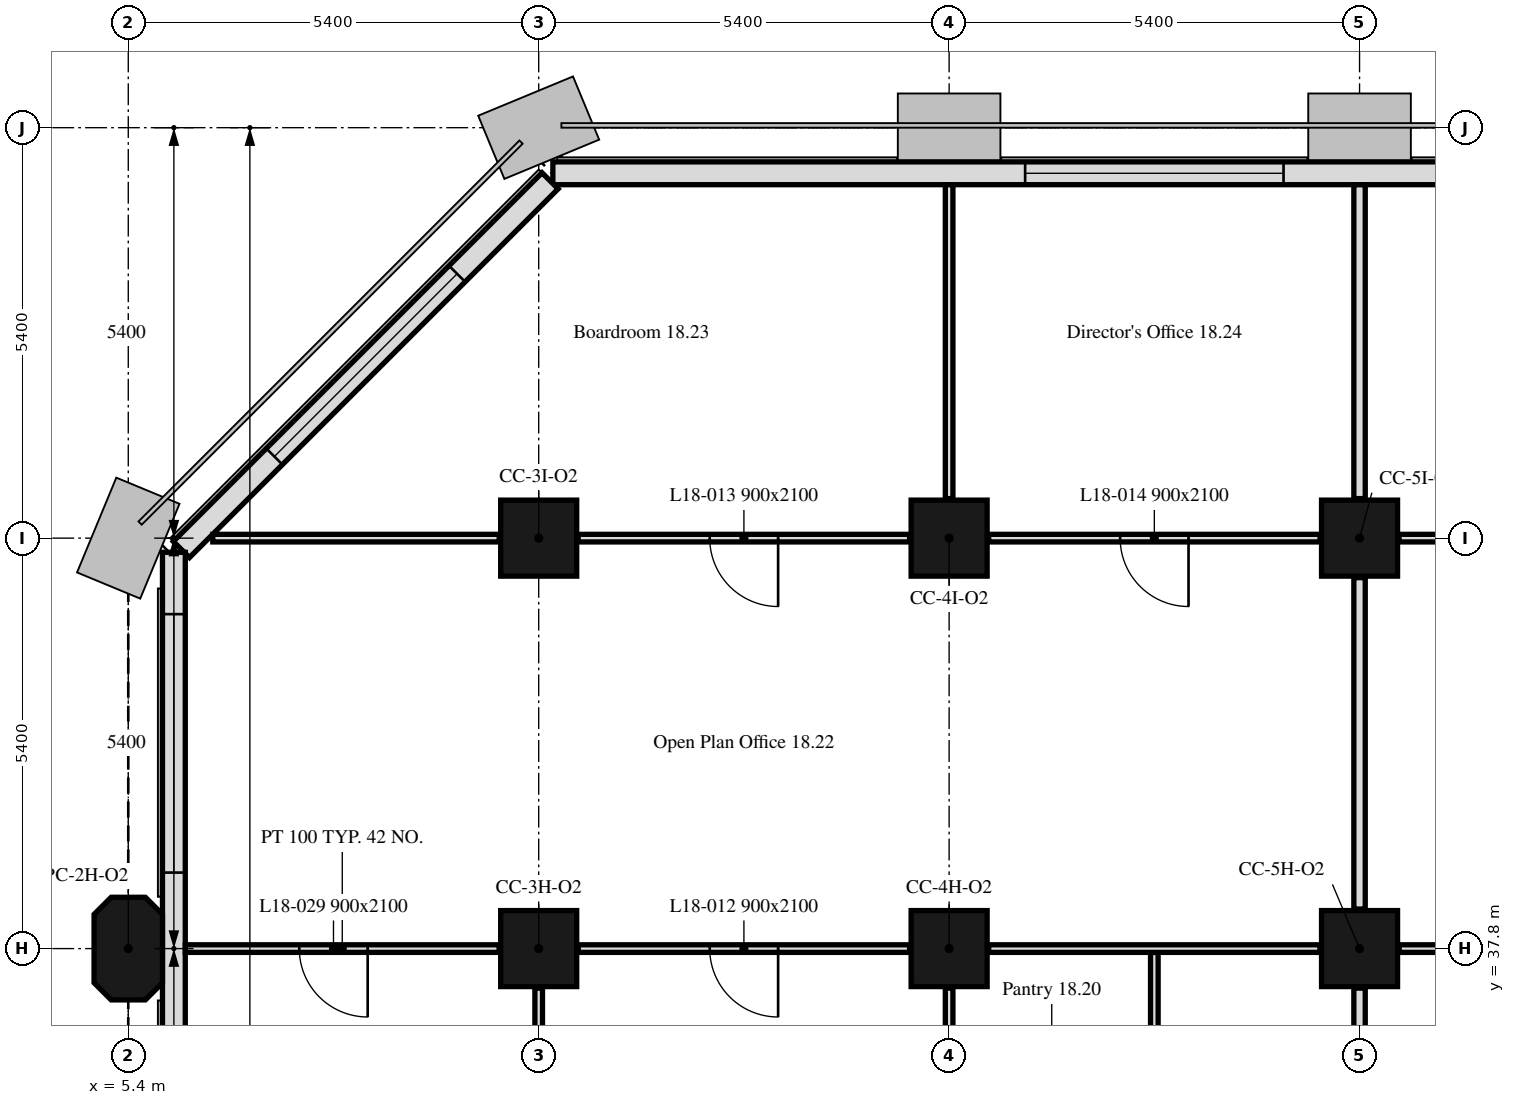
"""IFC4 building model, lengths in metres.
Left out: names, types, materials, properties, quantities, classifications, styles, units other than length and angle.
Written with IfcOpenShell. Run it as: python <this file> out.ifc"""

import sys

from ifc_helpers import new_model, si_unit, direction, frame, frame_2d, origin, origin_2d, place, context, subcontext, project, spatial, polyline, rectangle, outline, extrude, element, fill, save


model = new_model("IFC4")
c1 = context("Model", 3, precision=1e-05, world=origin(), true_north=direction((0.0, 1.0)))
c2 = subcontext(c1, "Body", "Model", "MODEL_VIEW")
j1 = project(units=[si_unit("LENGTHUNIT", "METRE"), si_unit("PLANEANGLEUNIT", "RADIAN")], contexts=[c1])
p1 = place(None, origin())
s1 = spatial("IfcSite", under=j1, at=p1, CompositionType="ELEMENT")
p2 = place(p1, origin())
s2 = spatial("IfcBuilding", under=s1, at=p2, CompositionType="ELEMENT")
p3 = place(p2, frame((0.0, 0.0, 80.2)))
s3 = spatial("IfcBuildingStorey", under=s2, at=p3, CompositionType="ELEMENT", Elevation=80.2)
p4 = place(p3, frame((5.4, 37.8, 0.0), z_axis=(0.0, 0.0, 1.0), x_axis=(0.0, 1.0, 0.0)))
e1 = element("IfcColumn", 1, at=p4, inside=s3, PredefinedType="COLUMN", context=c2, shape_type="SweptSolid", body=[
    extrude(outline(polyline([(-0.45, -0.45), (0.45, -0.45), (0.675, -0.225), (0.675, 0.225), (0.45, 0.45), (-0.45, 0.45), (-0.675, 0.225), (-0.675, -0.225), (-0.45, -0.45)])), origin(), (0.0, 0.0, 1.0), 3.5),
])
for number, where, z_axis, x_axis in (
    (2, (10.8, 37.8, 0.0), (0.0, 0.0, 1.0), (1.0, 0.0, 0.0)),
    (3, (16.2, 37.8, 0.0), (0.0, 0.0, 1.0), (1.0, 0.0, 0.0)),
    (4, (21.6, 37.8, 0.0), (0.0, 0.0, 1.0), (1.0, 0.0, 0.0)),
    (5, (10.8, 43.2, 0.0), (0.0, 0.0, 1.0), (1.0, 0.0, 0.0)),
    (6, (16.2, 43.2, 0.0), (0.0, 0.0, 1.0), (1.0, 0.0, 0.0)),
    (7, (21.6, 43.2, 0.0), (0.0, 0.0, 1.0), (1.0, 0.0, 0.0)),
):
    element("IfcColumn", number, at=place(p3, frame(where, z_axis=z_axis, x_axis=x_axis)), inside=s3, PredefinedType="COLUMN", context=c2, shape_type="SweptSolid", body=[
        extrude(rectangle(XDim=1.0, YDim=1.0, at=origin_2d()), origin(), (0.0, 0.0, 1.0), 3.5),
    ])
p5 = place(p3, frame((43.014, 48.0, 0.0), z_axis=(0.0, 0.0, 1.0), x_axis=(-1.0, 0.0, 0.0)))
e8 = element("IfcWall", 8, at=p5, inside=s3, PredefinedType="SOLIDWALL", context=c2, shape_type="SweptSolid", body=[
    extrude(rectangle(XDim=32.027, YDim=0.3, at=frame_2d((16.014, 0.0))), origin(), (0.0, 0.0, 1.0), 3.5),
])
p6 = place(p5, frame((0.814, 0.0, 0.9)))
e9 = element("IfcOpeningElement", 9, at=p6, cuts=e8, PredefinedType="OPENING", context=c2, shape_type="SweptSolid", body=[
    extrude(rectangle(XDim=3.4, YDim=1.7, at=frame_2d((1.7, 0.85))), frame((0.0, 0.16, 0.0), z_axis=(0.0, -1.0, 0.0), x_axis=(1.0, 0.0, 0.0)), (0.0, 0.0, 1.0), 0.32),
])
p7 = place(p5, frame((11.614, 0.0, 0.9)))
e10 = element("IfcOpeningElement", 10, at=p7, cuts=e8, PredefinedType="OPENING", context=c2, shape_type="SweptSolid", body=[
    extrude(rectangle(XDim=3.4, YDim=1.7, at=frame_2d((1.7, 0.85))), frame((0.0, 0.16, 0.0), z_axis=(0.0, -1.0, 0.0), x_axis=(1.0, 0.0, 0.0)), (0.0, 0.0, 1.0), 0.32),
])
p8 = place(p5, frame((22.414, 0.0, 0.9)))
e11 = element("IfcOpeningElement", 11, at=p8, cuts=e8, PredefinedType="OPENING", context=c2, shape_type="SweptSolid", body=[
    extrude(rectangle(XDim=3.4, YDim=1.7, at=frame_2d((1.7, 0.85))), frame((0.0, 0.16, 0.0), z_axis=(0.0, -1.0, 0.0), x_axis=(1.0, 0.0, 0.0)), (0.0, 0.0, 1.0), 0.32),
])
p9 = place(p3, frame((10.949, 47.901, 0.0), z_axis=(0.0, 0.0, 1.0), x_axis=(-0.707106781187, -0.707106781187, 0.0)))
e12 = element("IfcWall", 12, at=p9, inside=s3, PredefinedType="SOLIDWALL", context=c2, shape_type="SweptSolid", body=[
    extrude(rectangle(XDim=6.86, YDim=0.3, at=frame_2d((3.43, 0.0))), origin(), (0.0, 0.0, 1.0), 3.5),
])
p10 = place(p9, frame((1.73, 0.0, 0.9)))
e13 = element("IfcOpeningElement", 13, at=p10, cuts=e12, PredefinedType="OPENING", context=c2, shape_type="SweptSolid", body=[
    extrude(rectangle(XDim=3.4, YDim=1.7, at=frame_2d((1.7, 0.85))), frame((0.0, 0.16, 0.0), z_axis=(0.0, -1.0, 0.0), x_axis=(1.0, 0.0, 0.0)), (0.0, 0.0, 1.0), 0.32),
])
p11 = place(p3, frame((6.0, 43.014, 0.0), z_axis=(0.0, 0.0, 1.0), x_axis=(0.0, -1.0, 0.0)))
e14 = element("IfcWall", 14, at=p11, inside=s3, PredefinedType="SOLIDWALL", context=c2, shape_type="SweptSolid", body=[
    extrude(rectangle(XDim=10.614, YDim=0.3, at=frame_2d((5.307, 0.0))), origin(), (0.0, 0.0, 1.0), 3.5),
])
p12 = place(p11, frame((0.814, 0.0, 0.9)))
e15 = element("IfcOpeningElement", 15, at=p12, cuts=e14, PredefinedType="OPENING", context=c2, shape_type="SweptSolid", body=[
    extrude(rectangle(XDim=3.4, YDim=1.7, at=frame_2d((1.7, 0.85))), frame((0.0, 0.16, 0.0), z_axis=(0.0, -1.0, 0.0), x_axis=(1.0, 0.0, 0.0)), (0.0, 0.0, 1.0), 0.32),
])
p13 = place(p3, frame((10.28, 37.8, 0.0), z_axis=(0.0, 0.0, 1.0), x_axis=(-1.0, 0.0, 0.0)))
e16 = element("IfcWall", 16, at=p13, inside=s3, PredefinedType="PARTITIONING", context=c2, shape_type="SweptSolid", body=[
    extrude(rectangle(XDim=4.129, YDim=0.1, at=frame_2d((2.064, 0.0))), origin(), (0.0, 0.0, 1.0), 3.5),
])
p14 = place(p13, frame((1.73, 0.0, 0.0)))
e17 = element("IfcOpeningElement", 17, at=p14, cuts=e16, PredefinedType="OPENING", context=c2, shape_type="SweptSolid", body=[
    extrude(rectangle(XDim=0.9, YDim=2.1, at=frame_2d((0.45, 1.05))), frame((0.0, 0.05, 0.0), z_axis=(0.0, -1.0, 0.0), x_axis=(1.0, 0.0, 0.0)), (0.0, 0.0, 1.0), 0.1),
])
p15 = place(p3, frame((10.8, 35.175, 0.0), z_axis=(0.0, 0.0, 1.0), x_axis=(0.0, 1.0, 0.0)))
e18 = element("IfcWall", 18, at=p15, inside=s3, PredefinedType="PARTITIONING", context=c2, shape_type="SweptSolid", body=[
    extrude(rectangle(XDim=2.105, YDim=0.1, at=frame_2d((1.052, 0.0))), origin(), (0.0, 0.0, 1.0), 3.5),
])
p16 = place(p3, frame((16.2, 35.175, 0.0), z_axis=(0.0, 0.0, 1.0), x_axis=(0.0, 1.0, 0.0)))
e19 = element("IfcWall", 19, at=p16, inside=s3, PredefinedType="PARTITIONING", context=c2, shape_type="SweptSolid", body=[
    extrude(rectangle(XDim=2.105, YDim=0.1, at=frame_2d((1.052, 0.0))), origin(), (0.0, 0.0, 1.0), 2.75),
])
p17 = place(p3, frame((15.68, 37.8, 0.0), z_axis=(0.0, 0.0, 1.0), x_axis=(-1.0, 0.0, 0.0)))
e20 = element("IfcWall", 20, at=p17, inside=s3, PredefinedType="PARTITIONING", context=c2, shape_type="SweptSolid", body=[
    extrude(rectangle(XDim=4.36, YDim=0.1, at=frame_2d((2.18, 0.0))), origin(), (0.0, 0.0, 1.0), 3.5),
])
p18 = place(p17, frame((1.73, 0.0, 0.0)))
e21 = element("IfcOpeningElement", 21, at=p18, cuts=e20, PredefinedType="OPENING", context=c2, shape_type="SweptSolid", body=[
    extrude(rectangle(XDim=0.9, YDim=2.1, at=frame_2d((0.45, 1.05))), frame((0.0, 0.05, 0.0), z_axis=(0.0, -1.0, 0.0), x_axis=(1.0, 0.0, 0.0)), (0.0, 0.0, 1.0), 0.1),
])
p19 = place(p3, frame((18.9, 35.175, 0.0), z_axis=(0.0, 0.0, 1.0), x_axis=(0.0, 1.0, 0.0)))
e22 = element("IfcWall", 22, at=p19, inside=s3, PredefinedType="PARTITIONING", context=c2, shape_type="SweptSolid", body=[
    extrude(rectangle(XDim=2.575, YDim=0.1, at=frame_2d((1.288, 0.0))), origin(), (0.0, 0.0, 1.0), 3.5),
])
p20 = place(p3, frame((21.6, 35.175, 0.0), z_axis=(0.0, 0.0, 1.0), x_axis=(0.0, 1.0, 0.0)))
e23 = element("IfcWall", 23, at=p20, inside=s3, PredefinedType="PARTITIONING", context=c2, shape_type="SweptSolid", body=[
    extrude(rectangle(XDim=2.105, YDim=0.15, at=frame_2d((1.052, 0.0))), origin(), (0.0, 0.0, 1.0), 2.75),
])
p21 = place(p3, frame((21.08, 37.8, 0.0), z_axis=(0.0, 0.0, 1.0), x_axis=(-1.0, 0.0, 0.0)))
e24 = element("IfcWall", 24, at=p21, inside=s3, PredefinedType="PARTITIONING", context=c2, shape_type="SweptSolid", body=[
    extrude(rectangle(XDim=4.36, YDim=0.1, at=frame_2d((2.18, 0.0))), origin(), (0.0, 0.0, 1.0), 3.5),
])
p22 = place(p3, frame((21.08, 43.2, 0.0), z_axis=(0.0, 0.0, 1.0), x_axis=(-1.0, 0.0, 0.0)))
e25 = element("IfcWall", 25, at=p22, inside=s3, PredefinedType="PARTITIONING", context=c2, shape_type="SweptSolid", body=[
    extrude(rectangle(XDim=4.36, YDim=0.1, at=frame_2d((2.18, 0.0))), origin(), (0.0, 0.0, 1.0), 3.5),
])
p23 = place(p22, frame((1.73, 0.0, 0.0)))
e26 = element("IfcOpeningElement", 26, at=p23, cuts=e25, PredefinedType="OPENING", context=c2, shape_type="SweptSolid", body=[
    extrude(rectangle(XDim=0.9, YDim=2.1, at=frame_2d((0.45, 1.05))), frame((0.0, 0.05, 0.0), z_axis=(0.0, -1.0, 0.0), x_axis=(1.0, 0.0, 0.0)), (0.0, 0.0, 1.0), 0.1),
])
p24 = place(p3, frame((15.68, 43.2, 0.0), z_axis=(0.0, 0.0, 1.0), x_axis=(-1.0, 0.0, 0.0)))
e27 = element("IfcWall", 27, at=p24, inside=s3, PredefinedType="PARTITIONING", context=c2, shape_type="SweptSolid", body=[
    extrude(rectangle(XDim=4.36, YDim=0.1, at=frame_2d((2.18, 0.0))), origin(), (0.0, 0.0, 1.0), 3.5),
])
p25 = place(p24, frame((1.73, 0.0, 0.0)))
e28 = element("IfcOpeningElement", 28, at=p25, cuts=e27, PredefinedType="OPENING", context=c2, shape_type="SweptSolid", body=[
    extrude(rectangle(XDim=0.9, YDim=2.1, at=frame_2d((0.45, 1.05))), frame((0.0, 0.05, 0.0), z_axis=(0.0, -1.0, 0.0), x_axis=(1.0, 0.0, 0.0)), (0.0, 0.0, 1.0), 0.1),
])
p26 = place(p3, frame((10.28, 43.2, 0.0), z_axis=(0.0, 0.0, 1.0), x_axis=(-1.0, 0.0, 0.0)))
e29 = element("IfcWall", 29, at=p26, inside=s3, PredefinedType="PARTITIONING", context=c2, shape_type="SweptSolid", body=[
    extrude(rectangle(XDim=3.768, YDim=0.1, at=frame_2d((1.884, 0.0))), origin(), (0.0, 0.0, 1.0), 3.5),
])
p27 = place(p3, frame((21.6, 38.32, 0.0), z_axis=(0.0, 0.0, 1.0), x_axis=(0.0, 1.0, 0.0)))
e30 = element("IfcWall", 30, at=p27, inside=s3, PredefinedType="PARTITIONING", context=c2, shape_type="SweptSolid", body=[
    extrude(rectangle(XDim=4.36, YDim=0.15, at=frame_2d((2.18, 0.0))), origin(), (0.0, 0.0, 1.0), 2.75),
])
p28 = place(p3, frame((16.2, 43.72, 0.0), z_axis=(0.0, 0.0, 1.0), x_axis=(0.0, 1.0, 0.0)))
e31 = element("IfcWall", 31, at=p28, inside=s3, PredefinedType="PARTITIONING", context=c2, shape_type="SweptSolid", body=[
    extrude(rectangle(XDim=4.129, YDim=0.1, at=frame_2d((2.064, 0.0))), origin(), (0.0, 0.0, 1.0), 2.75),
])
p29 = place(p3, frame((21.6, 43.72, 0.0), z_axis=(0.0, 0.0, 1.0), x_axis=(0.0, 1.0, 0.0)))
e32 = element("IfcWall", 32, at=p29, inside=s3, PredefinedType="PARTITIONING", context=c2, shape_type="SweptSolid", body=[
    extrude(rectangle(XDim=4.129, YDim=0.15, at=frame_2d((2.064, 0.0))), origin(), (0.0, 0.0, 1.0), 2.75),
])
p30 = place(p3, frame((26.48, 37.8, 0.0), z_axis=(0.0, 0.0, 1.0), x_axis=(-1.0, 0.0, 0.0)))
e33 = element("IfcWall", 33, at=p30, inside=s3, PredefinedType="PARTITIONING", context=c2, shape_type="SweptSolid", body=[
    extrude(rectangle(XDim=4.36, YDim=0.1, at=frame_2d((2.18, 0.0))), origin(), (0.0, 0.0, 1.0), 3.5),
])
p31 = place(p30, frame((1.73, 0.0, 0.0)))
e34 = element("IfcOpeningElement", 34, at=p31, cuts=e33, PredefinedType="OPENING", context=c2, shape_type="SweptSolid", body=[
    extrude(rectangle(XDim=0.9, YDim=2.1, at=frame_2d((0.45, 1.05))), frame((0.0, 0.05, 0.0), z_axis=(0.0, -1.0, 0.0), x_axis=(1.0, 0.0, 0.0)), (0.0, 0.0, 1.0), 0.1),
])
p32 = place(p3, frame((26.48, 43.2, 0.0), z_axis=(0.0, 0.0, 1.0), x_axis=(-1.0, 0.0, 0.0)))
e35 = element("IfcWall", 35, at=p32, inside=s3, PredefinedType="PARTITIONING", context=c2, shape_type="SweptSolid", body=[
    extrude(rectangle(XDim=4.36, YDim=0.1, at=frame_2d((2.18, 0.0))), origin(), (0.0, 0.0, 1.0), 3.5),
])
p33 = place(p32, frame((1.73, 0.0, 0.0)))
e36 = element("IfcOpeningElement", 36, at=p33, cuts=e35, PredefinedType="OPENING", context=c2, shape_type="SweptSolid", body=[
    extrude(rectangle(XDim=0.9, YDim=2.1, at=frame_2d((0.45, 1.05))), frame((0.0, 0.05, 0.0), z_axis=(0.0, -1.0, 0.0), x_axis=(1.0, 0.0, 0.0)), (0.0, 0.0, 1.0), 0.1),
])
p34 = place(p8, origin())
e37 = element("IfcWindow", 37, at=p34, inside=s3, PartitioningType="SINGLE_PANEL", PredefinedType="WINDOW", context=c2, shape_type="SweptSolid", body=[
    extrude(rectangle(XDim=3.4, YDim=1.7, at=frame_2d((1.7, 0.85))), frame((0.0, 0.03, 0.0), z_axis=(0.0, -1.0, 0.0), x_axis=(1.0, 0.0, 0.0)), (0.0, 0.0, 1.0), 0.06),
])
fill(e11, e37)
p35 = place(p10, origin())
e38 = element("IfcWindow", 38, at=p35, inside=s3, PartitioningType="SINGLE_PANEL", PredefinedType="WINDOW", context=c2, shape_type="SweptSolid", body=[
    extrude(rectangle(XDim=3.4, YDim=1.7, at=frame_2d((1.7, 0.85))), frame((0.0, 0.03, 0.0), z_axis=(0.0, -1.0, 0.0), x_axis=(1.0, 0.0, 0.0)), (0.0, 0.0, 1.0), 0.06),
])
fill(e13, e38)
p36 = place(p12, origin())
e39 = element("IfcWindow", 39, at=p36, inside=s3, PartitioningType="SINGLE_PANEL", PredefinedType="WINDOW", context=c2, shape_type="SweptSolid", body=[
    extrude(rectangle(XDim=3.4, YDim=1.7, at=frame_2d((1.7, 0.85))), frame((0.0, 0.03, 0.0), z_axis=(0.0, -1.0, 0.0), x_axis=(1.0, 0.0, 0.0)), (0.0, 0.0, 1.0), 0.06),
])
fill(e15, e39)
p37 = place(p18, origin())
e40 = element("IfcDoor", 40, at=p37, inside=s3, OperationType="SINGLE_SWING_LEFT", PredefinedType="DOOR", context=c2, shape_type="SweptSolid", body=[
    extrude(rectangle(XDim=0.9, YDim=2.1, at=frame_2d((0.45, 1.05))), frame((0.0, 0.025, 0.0), z_axis=(0.0, -1.0, 0.0), x_axis=(1.0, 0.0, 0.0)), (0.0, 0.0, 1.0), 0.05),
])
fill(e21, e40)
p38 = place(p25, origin())
e41 = element("IfcDoor", 41, at=p38, inside=s3, OperationType="SINGLE_SWING_LEFT", PredefinedType="DOOR", context=c2, shape_type="SweptSolid", body=[
    extrude(rectangle(XDim=0.9, YDim=2.1, at=frame_2d((0.45, 1.05))), frame((0.0, 0.025, 0.0), z_axis=(0.0, -1.0, 0.0), x_axis=(1.0, 0.0, 0.0)), (0.0, 0.0, 1.0), 0.05),
])
fill(e28, e41)
p39 = place(p23, origin())
e42 = element("IfcDoor", 42, at=p39, inside=s3, OperationType="SINGLE_SWING_LEFT", PredefinedType="DOOR", context=c2, shape_type="SweptSolid", body=[
    extrude(rectangle(XDim=0.9, YDim=2.1, at=frame_2d((0.45, 1.05))), frame((0.0, 0.025, 0.0), z_axis=(0.0, -1.0, 0.0), x_axis=(1.0, 0.0, 0.0)), (0.0, 0.0, 1.0), 0.05),
])
fill(e26, e42)
p40 = place(p14, origin())
e43 = element("IfcDoor", 43, at=p40, inside=s3, OperationType="SINGLE_SWING_RIGHT", PredefinedType="DOOR", context=c2, shape_type="SweptSolid", body=[
    extrude(rectangle(XDim=0.9, YDim=2.1, at=frame_2d((0.45, 1.05))), frame((0.0, 0.025, 0.0), z_axis=(0.0, -1.0, 0.0), x_axis=(1.0, 0.0, 0.0)), (0.0, 0.0, 1.0), 0.05),
])
fill(e17, e43)
save(model, sys.argv[1])
